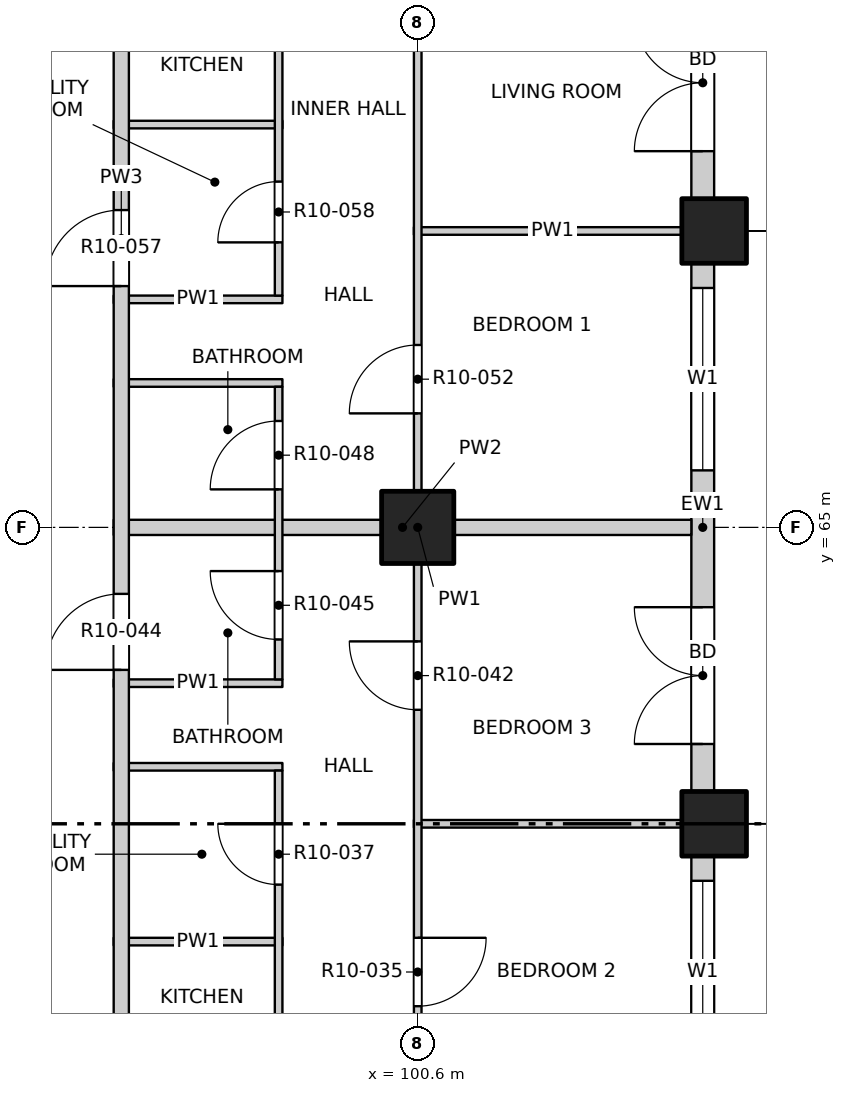
"""IFC4 building model, lengths in metres.
Left out: names, types, materials, properties, quantities, classifications, styles, units other than length and angle.
Written with IfcOpenShell. Run it as: python <this file> out.ifc"""

import sys

from ifc_helpers import new_model, si_unit, direction, frame, frame_2d, origin, origin_2d, place, context, subcontext, project, spatial, rectangle, extrude, element, fill, save


model = new_model("IFC4")
c1 = context("Model", 3, precision=1e-05, world=origin(), true_north=direction((0.0, 1.0)))
c2 = subcontext(c1, "Body", "Model", "MODEL_VIEW")
j1 = project(units=[si_unit("LENGTHUNIT", "METRE"), si_unit("PLANEANGLEUNIT", "RADIAN")], contexts=[c1])
p1 = place(None, origin())
s1 = spatial("IfcSite", under=j1, at=p1, CompositionType="ELEMENT")
p2 = place(p1, origin())
s2 = spatial("IfcBuilding", under=s1, at=p2, CompositionType="ELEMENT")
p3 = place(p2, frame((0.0, 0.0, 123.7)))
s3 = spatial("IfcBuildingStorey", under=s2, at=p3, CompositionType="ELEMENT", Elevation=123.7)
for number, where, z_axis, x_axis in (
    (1, (104.5, 61.1, -0.3), (0.0, 0.0, 1.0), (1.0, 0.0, 0.0)),
    (2, (104.5, 68.9, -0.3), (0.0, 0.0, 1.0), (1.0, 0.0, 0.0)),
):
    element("IfcColumn", number, at=place(p3, frame(where, z_axis=z_axis, x_axis=x_axis)), inside=s3, PredefinedType="COLUMN", context=c2, shape_type="SweptSolid", body=[
        extrude(rectangle(XDim=0.85, YDim=0.85, at=origin_2d()), origin(), (0.0, 0.0, 1.0), 3.45),
    ])
p4 = place(p3, frame((100.6, 65.0, -0.3), z_axis=(0.0, 0.0, 1.0), x_axis=(1.0, 0.0, 0.0)))
e3 = element("IfcColumn", 3, at=p4, inside=s3, PredefinedType="COLUMN", context=c2, shape_type="SweptSolid", body=[
    extrude(rectangle(XDim=0.95, YDim=0.95, at=origin_2d()), origin(), (0.0, 0.0, 1.0), 3.45),
])
p5 = place(p3, frame((104.35, 53.725, 0.0), z_axis=(0.0, 0.0, 1.0), x_axis=(0.0, 1.0, 0.0)))
e4 = element("IfcWall", 4, at=p5, inside=s3, PredefinedType="SOLIDWALL", context=c2, shape_type="SweptSolid", body=[
    extrude(rectangle(XDim=6.95, YDim=0.3, at=frame_2d((3.475, 0.0))), origin(), (0.0, 0.0, 1.0), 2.7),
])
p6 = place(p5, frame((0.625, 0.0, 0.0)))
e5 = element("IfcOpeningElement", 5, at=p6, cuts=e4, PredefinedType="OPENING", context=c2, shape_type="SweptSolid", body=[
    extrude(rectangle(XDim=1.8, YDim=2.4, at=frame_2d((0.9, 1.2))), frame((0.0, 0.16, 0.0), z_axis=(0.0, -1.0, 0.0), x_axis=(1.0, 0.0, 0.0)), (0.0, 0.0, 1.0), 0.32),
])
p7 = place(p5, frame((4.225, 0.0, 0.9)))
e6 = element("IfcOpeningElement", 6, at=p7, cuts=e4, PredefinedType="OPENING", context=c2, shape_type="SweptSolid", body=[
    extrude(rectangle(XDim=2.4, YDim=1.8, at=frame_2d((1.2, 0.9))), frame((0.0, 0.16, 0.0), z_axis=(0.0, -1.0, 0.0), x_axis=(1.0, 0.0, 0.0)), (0.0, 0.0, 1.0), 0.32),
])
p8 = place(p3, frame((104.35, 61.525, 0.0), z_axis=(0.0, 0.0, 1.0), x_axis=(0.0, 1.0, 0.0)))
e7 = element("IfcWall", 7, at=p8, inside=s3, PredefinedType="SOLIDWALL", context=c2, shape_type="SweptSolid", body=[
    extrude(rectangle(XDim=6.95, YDim=0.3, at=frame_2d((3.475, 0.0))), origin(), (0.0, 0.0, 1.0), 2.7),
])
p9 = place(p8, frame((0.625, 0.0, 0.0)))
e8 = element("IfcOpeningElement", 8, at=p9, cuts=e7, PredefinedType="OPENING", context=c2, shape_type="SweptSolid", body=[
    extrude(rectangle(XDim=1.8, YDim=2.4, at=frame_2d((0.9, 1.2))), frame((0.0, 0.16, 0.0), z_axis=(0.0, -1.0, 0.0), x_axis=(1.0, 0.0, 0.0)), (0.0, 0.0, 1.0), 0.32),
])
p10 = place(p8, frame((4.225, 0.0, 0.9)))
e9 = element("IfcOpeningElement", 9, at=p10, cuts=e7, PredefinedType="OPENING", context=c2, shape_type="SweptSolid", body=[
    extrude(rectangle(XDim=2.4, YDim=1.8, at=frame_2d((1.2, 0.9))), frame((0.0, 0.16, 0.0), z_axis=(0.0, -1.0, 0.0), x_axis=(1.0, 0.0, 0.0)), (0.0, 0.0, 1.0), 0.32),
])
p11 = place(p3, frame((104.35, 69.325, 0.0), z_axis=(0.0, 0.0, 1.0), x_axis=(0.0, 1.0, 0.0)))
e10 = element("IfcWall", 10, at=p11, inside=s3, PredefinedType="SOLIDWALL", context=c2, shape_type="SweptSolid", body=[
    extrude(rectangle(XDim=6.95, YDim=0.3, at=frame_2d((3.475, 0.0))), origin(), (0.0, 0.0, 1.0), 2.7),
])
p12 = place(p11, frame((0.625, 0.0, 0.0)))
e11 = element("IfcOpeningElement", 11, at=p12, cuts=e10, PredefinedType="OPENING", context=c2, shape_type="SweptSolid", body=[
    extrude(rectangle(XDim=1.8, YDim=2.4, at=frame_2d((0.9, 1.2))), frame((0.0, 0.16, 0.0), z_axis=(0.0, -1.0, 0.0), x_axis=(1.0, 0.0, 0.0)), (0.0, 0.0, 1.0), 0.32),
])
p13 = place(p11, frame((4.225, 0.0, 0.9)))
e12 = element("IfcOpeningElement", 12, at=p13, cuts=e10, PredefinedType="OPENING", context=c2, shape_type="SweptSolid", body=[
    extrude(rectangle(XDim=2.4, YDim=1.8, at=frame_2d((1.2, 0.9))), frame((0.0, 0.16, 0.0), z_axis=(0.0, -1.0, 0.0), x_axis=(1.0, 0.0, 0.0)), (0.0, 0.0, 1.0), 0.32),
])
p14 = place(p3, frame((96.6, 59.55, 0.0), z_axis=(0.0, 0.0, 1.0), x_axis=(1.0, 0.0, 0.0)))
e13 = element("IfcWall", 13, at=p14, inside=s3, PredefinedType="PARTITIONING", context=c2, shape_type="SweptSolid", body=[
    extrude(rectangle(XDim=2.22, YDim=0.1, at=frame_2d((1.11, 0.0))), origin(), (0.0, 0.0, 1.0), 3.15),
])
p15 = place(p3, frame((100.55, 61.1, 0.0), z_axis=(0.0, 0.0, 1.0), x_axis=(1.0, 0.0, 0.0)))
e14 = element("IfcWall", 14, at=p15, inside=s3, PredefinedType="PARTITIONING", context=c2, shape_type="SweptSolid", body=[
    extrude(rectangle(XDim=3.65, YDim=0.1, at=frame_2d((1.825, 0.0))), origin(), (0.0, 0.0, 1.0), 2.55),
])
for number, where, z_axis, x_axis in (
    (15, (96.6, 61.85, 0.0), (0.0, 0.0, 1.0), (1.0, 0.0, 0.0)),
    (16, (96.6, 62.95, 0.0), (0.0, 0.0, 1.0), (1.0, 0.0, 0.0)),
):
    element("IfcWall", number, at=place(p3, frame(where, z_axis=z_axis, x_axis=x_axis)), inside=s3, PredefinedType="PARTITIONING", context=c2, shape_type="SweptSolid", body=[
        extrude(rectangle(XDim=2.22, YDim=0.1, at=frame_2d((1.11, 0.0))), origin(), (0.0, 0.0, 1.0), 3.15),
    ])
p16 = place(p3, frame((96.6, 65.0, 0.0), z_axis=(0.0, 0.0, 1.0), x_axis=(1.0, 0.0, 0.0)))
e17 = element("IfcWall", 17, at=p16, inside=s3, PredefinedType="PARTITIONING", context=c2, shape_type="SweptSolid", body=[
    extrude(rectangle(XDim=7.6, YDim=0.2, at=frame_2d((3.8, 0.0))), origin(), (0.0, 0.0, 1.0), 3.15),
])
for number, where, z_axis, x_axis in (
    (18, (96.6, 66.9, 0.0), (0.0, 0.0, 1.0), (1.0, 0.0, 0.0)),
    (19, (96.6, 68.0, 0.0), (0.0, 0.0, 1.0), (1.0, 0.0, 0.0)),
):
    element("IfcWall", number, at=place(p3, frame(where, z_axis=z_axis, x_axis=x_axis)), inside=s3, PredefinedType="PARTITIONING", context=c2, shape_type="SweptSolid", body=[
        extrude(rectangle(XDim=2.22, YDim=0.1, at=frame_2d((1.11, 0.0))), origin(), (0.0, 0.0, 1.0), 3.15),
    ])
p17 = place(p3, frame((100.55, 68.9, 0.0), z_axis=(0.0, 0.0, 1.0), x_axis=(1.0, 0.0, 0.0)))
e20 = element("IfcWall", 20, at=p17, inside=s3, PredefinedType="PARTITIONING", context=c2, shape_type="SweptSolid", body=[
    extrude(rectangle(XDim=3.65, YDim=0.1, at=frame_2d((1.825, 0.0))), origin(), (0.0, 0.0, 1.0), 2.55),
])
p18 = place(p3, frame((96.6, 70.3, 0.0), z_axis=(0.0, 0.0, 1.0), x_axis=(1.0, 0.0, 0.0)))
e21 = element("IfcWall", 21, at=p18, inside=s3, PredefinedType="PARTITIONING", context=c2, shape_type="SweptSolid", body=[
    extrude(rectangle(XDim=2.22, YDim=0.1, at=frame_2d((1.11, 0.0))), origin(), (0.0, 0.0, 1.0), 3.15),
])
p19 = place(p3, frame((96.7, 53.4, 0.0), z_axis=(0.0, 0.0, 1.0), x_axis=(0.0, 1.0, 0.0)))
e22 = element("IfcWall", 22, at=p19, inside=s3, PredefinedType="PARTITIONING", context=c2, shape_type="SweptSolid", body=[
    extrude(rectangle(XDim=30.8, YDim=0.2, at=frame_2d((15.4, 0.0))), origin(), (0.0, 0.0, 1.0), 3.15),
])
p20 = place(p19, frame((9.725, 0.0, 0.0)))
e23 = element("IfcOpeningElement", 23, at=p20, cuts=e22, PredefinedType="OPENING", context=c2, shape_type="SweptSolid", body=[
    extrude(rectangle(XDim=1.0, YDim=2.1, at=frame_2d((0.5, 1.05))), frame((0.0, 0.11, 0.0), z_axis=(0.0, -1.0, 0.0), x_axis=(1.0, 0.0, 0.0)), (0.0, 0.0, 1.0), 0.22),
])
p21 = place(p19, frame((14.775, 0.0, 0.0)))
e24 = element("IfcOpeningElement", 24, at=p21, cuts=e22, PredefinedType="OPENING", context=c2, shape_type="SweptSolid", body=[
    extrude(rectangle(XDim=1.0, YDim=2.1, at=frame_2d((0.5, 1.05))), frame((0.0, 0.11, 0.0), z_axis=(0.0, -1.0, 0.0), x_axis=(1.0, 0.0, 0.0)), (0.0, 0.0, 1.0), 0.22),
])
p22 = place(p3, frame((98.77, 49.45, 0.0), z_axis=(0.0, 0.0, 1.0), x_axis=(0.0, 1.0, 0.0)))
e25 = element("IfcWall", 25, at=p22, inside=s3, PredefinedType="PARTITIONING", context=c2, shape_type="SweptSolid", body=[
    extrude(rectangle(XDim=12.35, YDim=0.1, at=frame_2d((6.175, 0.0))), origin(), (0.0, 0.0, 1.0), 3.15),
])
p23 = place(p22, frame((0.4, 0.0, 0.0)))
e26 = element("IfcOpeningElement", 26, at=p23, cuts=e25, PredefinedType="OPENING", context=c2, shape_type="SweptSolid", body=[
    extrude(rectangle(XDim=0.9, YDim=2.1, at=frame_2d((0.45, 1.05))), frame((0.0, 0.06, 0.0), z_axis=(0.0, -1.0, 0.0), x_axis=(1.0, 0.0, 0.0)), (0.0, 0.0, 1.0), 0.12),
])
p24 = place(p22, frame((2.65, 0.0, 0.0)))
e27 = element("IfcOpeningElement", 27, at=p24, cuts=e25, PredefinedType="OPENING", context=c2, shape_type="SweptSolid", body=[
    extrude(rectangle(XDim=0.8, YDim=2.1, at=frame_2d((0.4, 1.05))), frame((0.0, 0.06, 0.0), z_axis=(0.0, -1.0, 0.0), x_axis=(1.0, 0.0, 0.0)), (0.0, 0.0, 1.0), 0.12),
])
p25 = place(p22, frame((5.29, 0.0, 0.0)))
e28 = element("IfcOpeningElement", 28, at=p25, cuts=e25, PredefinedType="OPENING", context=c2, shape_type="SweptSolid", body=[
    extrude(rectangle(XDim=0.8, YDim=2.1, at=frame_2d((0.4, 1.05))), frame((0.0, 0.06, 0.0), z_axis=(0.0, -1.0, 0.0), x_axis=(1.0, 0.0, 0.0)), (0.0, 0.0, 1.0), 0.12),
])
p26 = place(p22, frame((8.115, 0.0, 0.0)))
e29 = element("IfcOpeningElement", 29, at=p26, cuts=e25, PredefinedType="OPENING", context=c2, shape_type="SweptSolid", body=[
    extrude(rectangle(XDim=0.9, YDim=2.1, at=frame_2d((0.45, 1.05))), frame((0.0, 0.06, 0.0), z_axis=(0.0, -1.0, 0.0), x_axis=(1.0, 0.0, 0.0)), (0.0, 0.0, 1.0), 0.12),
])
p27 = place(p22, frame((10.85, 0.0, 0.0)))
e30 = element("IfcOpeningElement", 30, at=p27, cuts=e25, PredefinedType="OPENING", context=c2, shape_type="SweptSolid", body=[
    extrude(rectangle(XDim=0.8, YDim=2.1, at=frame_2d((0.4, 1.05))), frame((0.0, 0.06, 0.0), z_axis=(0.0, -1.0, 0.0), x_axis=(1.0, 0.0, 0.0)), (0.0, 0.0, 1.0), 0.12),
])
p28 = place(p3, frame((98.77, 63.0, 0.0), z_axis=(0.0, 0.0, 1.0), x_axis=(0.0, 1.0, 0.0)))
e31 = element("IfcWall", 31, at=p28, inside=s3, PredefinedType="PARTITIONING", context=c2, shape_type="SweptSolid", body=[
    extrude(rectangle(XDim=3.85, YDim=0.1, at=frame_2d((1.925, 0.0))), origin(), (0.0, 0.0, 1.0), 3.15),
])
p29 = place(p28, frame((0.525, 0.0, 0.0)))
e32 = element("IfcOpeningElement", 32, at=p29, cuts=e31, PredefinedType="OPENING", context=c2, shape_type="SweptSolid", body=[
    extrude(rectangle(XDim=0.9, YDim=2.1, at=frame_2d((0.45, 1.05))), frame((0.0, 0.06, 0.0), z_axis=(0.0, -1.0, 0.0), x_axis=(1.0, 0.0, 0.0)), (0.0, 0.0, 1.0), 0.12),
])
p30 = place(p28, frame((2.5, 0.0, 0.0)))
e33 = element("IfcOpeningElement", 33, at=p30, cuts=e31, PredefinedType="OPENING", context=c2, shape_type="SweptSolid", body=[
    extrude(rectangle(XDim=0.9, YDim=2.1, at=frame_2d((0.45, 1.05))), frame((0.0, 0.06, 0.0), z_axis=(0.0, -1.0, 0.0), x_axis=(1.0, 0.0, 0.0)), (0.0, 0.0, 1.0), 0.12),
])
p31 = place(p3, frame((98.77, 68.05, 0.0), z_axis=(0.0, 0.0, 1.0), x_axis=(0.0, 1.0, 0.0)))
e34 = element("IfcWall", 34, at=p31, inside=s3, PredefinedType="PARTITIONING", context=c2, shape_type="SweptSolid", body=[
    extrude(rectangle(XDim=12.5, YDim=0.1, at=frame_2d((6.25, 0.0))), origin(), (0.0, 0.0, 1.0), 3.15),
])
p32 = place(p31, frame((0.7, 0.0, 0.0)))
e35 = element("IfcOpeningElement", 35, at=p32, cuts=e34, PredefinedType="OPENING", context=c2, shape_type="SweptSolid", body=[
    extrude(rectangle(XDim=0.8, YDim=2.1, at=frame_2d((0.4, 1.05))), frame((0.0, 0.06, 0.0), z_axis=(0.0, -1.0, 0.0), x_axis=(1.0, 0.0, 0.0)), (0.0, 0.0, 1.0), 0.12),
])
p33 = place(p31, frame((3.41, 0.0, 0.0)))
e36 = element("IfcOpeningElement", 36, at=p33, cuts=e34, PredefinedType="OPENING", context=c2, shape_type="SweptSolid", body=[
    extrude(rectangle(XDim=0.9, YDim=2.1, at=frame_2d((0.45, 1.05))), frame((0.0, 0.06, 0.0), z_axis=(0.0, -1.0, 0.0), x_axis=(1.0, 0.0, 0.0)), (0.0, 0.0, 1.0), 0.12),
])
p34 = place(p31, frame((5.92, 0.0, 0.0)))
e37 = element("IfcOpeningElement", 37, at=p34, cuts=e34, PredefinedType="OPENING", context=c2, shape_type="SweptSolid", body=[
    extrude(rectangle(XDim=0.9, YDim=2.1, at=frame_2d((0.45, 1.05))), frame((0.0, 0.06, 0.0), z_axis=(0.0, -1.0, 0.0), x_axis=(1.0, 0.0, 0.0)), (0.0, 0.0, 1.0), 0.12),
])
p35 = place(p31, frame((8.21, 0.0, 0.0)))
e38 = element("IfcOpeningElement", 38, at=p35, cuts=e34, PredefinedType="OPENING", context=c2, shape_type="SweptSolid", body=[
    extrude(rectangle(XDim=0.8, YDim=2.1, at=frame_2d((0.4, 1.05))), frame((0.0, 0.06, 0.0), z_axis=(0.0, -1.0, 0.0), x_axis=(1.0, 0.0, 0.0)), (0.0, 0.0, 1.0), 0.12),
])
p36 = place(p31, frame((10.85, 0.0, 0.0)))
e39 = element("IfcOpeningElement", 39, at=p36, cuts=e34, PredefinedType="OPENING", context=c2, shape_type="SweptSolid", body=[
    extrude(rectangle(XDim=0.8, YDim=2.1, at=frame_2d((0.4, 1.05))), frame((0.0, 0.06, 0.0), z_axis=(0.0, -1.0, 0.0), x_axis=(1.0, 0.0, 0.0)), (0.0, 0.0, 1.0), 0.12),
])
p37 = place(p3, frame((100.6, 45.8, 0.0), z_axis=(0.0, 0.0, 1.0), x_axis=(0.0, 1.0, 0.0)))
e40 = element("IfcWall", 40, at=p37, inside=s3, PredefinedType="PARTITIONING", context=c2, shape_type="SweptSolid", body=[
    extrude(rectangle(XDim=38.4, YDim=0.1, at=frame_2d((19.2, 0.0))), origin(), (0.0, 0.0, 1.0), 3.15),
])
p38 = place(p37, frame((1.05, 0.0, 0.0)))
e41 = element("IfcOpeningElement", 41, at=p38, cuts=e40, PredefinedType="OPENING", context=c2, shape_type="SweptSolid", body=[
    extrude(rectangle(XDim=1.2, YDim=2.1, at=frame_2d((0.6, 1.05))), frame((0.0, 0.06, 0.0), z_axis=(0.0, -1.0, 0.0), x_axis=(1.0, 0.0, 0.0)), (0.0, 0.0, 1.0), 0.12),
])
p39 = place(p37, frame((6.9, 0.0, 0.0)))
e42 = element("IfcOpeningElement", 42, at=p39, cuts=e40, PredefinedType="OPENING", context=c2, shape_type="SweptSolid", body=[
    extrude(rectangle(XDim=1.2, YDim=2.1, at=frame_2d((0.6, 1.05))), frame((0.0, 0.06, 0.0), z_axis=(0.0, -1.0, 0.0), x_axis=(1.0, 0.0, 0.0)), (0.0, 0.0, 1.0), 0.12),
])
p40 = place(p37, frame((12.9, 0.0, 0.0)))
e43 = element("IfcOpeningElement", 43, at=p40, cuts=e40, PredefinedType="OPENING", context=c2, shape_type="SweptSolid", body=[
    extrude(rectangle(XDim=0.9, YDim=2.1, at=frame_2d((0.45, 1.05))), frame((0.0, 0.06, 0.0), z_axis=(0.0, -1.0, 0.0), x_axis=(1.0, 0.0, 0.0)), (0.0, 0.0, 1.0), 0.12),
])
p41 = place(p37, frame((16.8, 0.0, 0.0)))
e44 = element("IfcOpeningElement", 44, at=p41, cuts=e40, PredefinedType="OPENING", context=c2, shape_type="SweptSolid", body=[
    extrude(rectangle(XDim=0.9, YDim=2.1, at=frame_2d((0.45, 1.05))), frame((0.0, 0.06, 0.0), z_axis=(0.0, -1.0, 0.0), x_axis=(1.0, 0.0, 0.0)), (0.0, 0.0, 1.0), 0.12),
])
p42 = place(p37, frame((20.7, 0.0, 0.0)))
e45 = element("IfcOpeningElement", 45, at=p42, cuts=e40, PredefinedType="OPENING", context=c2, shape_type="SweptSolid", body=[
    extrude(rectangle(XDim=0.9, YDim=2.1, at=frame_2d((0.45, 1.05))), frame((0.0, 0.06, 0.0), z_axis=(0.0, -1.0, 0.0), x_axis=(1.0, 0.0, 0.0)), (0.0, 0.0, 1.0), 0.12),
])
p43 = place(p37, frame((27.575, 0.0, 0.0)))
e46 = element("IfcOpeningElement", 46, at=p43, cuts=e40, PredefinedType="OPENING", context=c2, shape_type="SweptSolid", body=[
    extrude(rectangle(XDim=1.2, YDim=2.1, at=frame_2d((0.6, 1.05))), frame((0.0, 0.06, 0.0), z_axis=(0.0, -1.0, 0.0), x_axis=(1.0, 0.0, 0.0)), (0.0, 0.0, 1.0), 0.12),
])
p44 = place(p37, frame((32.4, 0.0, 0.0)))
e47 = element("IfcOpeningElement", 47, at=p44, cuts=e40, PredefinedType="OPENING", context=c2, shape_type="SweptSolid", body=[
    extrude(rectangle(XDim=0.9, YDim=2.1, at=frame_2d((0.45, 1.05))), frame((0.0, 0.06, 0.0), z_axis=(0.0, -1.0, 0.0), x_axis=(1.0, 0.0, 0.0)), (0.0, 0.0, 1.0), 0.12),
])
p45 = place(p37, frame((36.15, 0.0, 0.0)))
e48 = element("IfcOpeningElement", 48, at=p45, cuts=e40, PredefinedType="OPENING", context=c2, shape_type="SweptSolid", body=[
    extrude(rectangle(XDim=1.2, YDim=2.1, at=frame_2d((0.6, 1.05))), frame((0.0, 0.06, 0.0), z_axis=(0.0, -1.0, 0.0), x_axis=(1.0, 0.0, 0.0)), (0.0, 0.0, 1.0), 0.12),
])
p46 = place(p7, origin())
e49 = element("IfcWindow", 49, at=p46, inside=s3, PartitioningType="DOUBLE_PANEL_VERTICAL", PredefinedType="WINDOW", context=c2, shape_type="SweptSolid", body=[
    extrude(rectangle(XDim=2.4, YDim=1.8, at=frame_2d((1.2, 0.9))), frame((0.0, 0.03, 0.0), z_axis=(0.0, -1.0, 0.0), x_axis=(1.0, 0.0, 0.0)), (0.0, 0.0, 1.0), 0.06),
])
fill(e6, e49)
p47 = place(p9, origin())
e50 = element("IfcDoor", 50, at=p47, inside=s3, OperationType="DOUBLE_DOOR_SINGLE_SWING", PredefinedType="DOOR", context=c2, shape_type="SweptSolid", body=[
    extrude(rectangle(XDim=1.8, YDim=2.4, at=frame_2d((0.9, 1.2))), frame((0.0, 0.025, 0.0), z_axis=(0.0, -1.0, 0.0), x_axis=(1.0, 0.0, 0.0)), (0.0, 0.0, 1.0), 0.05),
])
fill(e8, e50)
p48 = place(p10, origin())
e51 = element("IfcWindow", 51, at=p48, inside=s3, PartitioningType="DOUBLE_PANEL_VERTICAL", PredefinedType="WINDOW", context=c2, shape_type="SweptSolid", body=[
    extrude(rectangle(XDim=2.4, YDim=1.8, at=frame_2d((1.2, 0.9))), frame((0.0, 0.03, 0.0), z_axis=(0.0, -1.0, 0.0), x_axis=(1.0, 0.0, 0.0)), (0.0, 0.0, 1.0), 0.06),
])
fill(e9, e51)
p49 = place(p12, origin())
e52 = element("IfcDoor", 52, at=p49, inside=s3, OperationType="DOUBLE_DOOR_SINGLE_SWING", PredefinedType="DOOR", context=c2, shape_type="SweptSolid", body=[
    extrude(rectangle(XDim=1.8, YDim=2.4, at=frame_2d((0.9, 1.2))), frame((0.0, 0.025, 0.0), z_axis=(0.0, -1.0, 0.0), x_axis=(1.0, 0.0, 0.0)), (0.0, 0.0, 1.0), 0.05),
])
fill(e11, e52)
p50 = place(p40, origin())
e53 = element("IfcDoor", 53, at=p50, inside=s3, OperationType="SINGLE_SWING_LEFT", PredefinedType="DOOR", context=c2, shape_type="SweptSolid", body=[
    extrude(rectangle(XDim=0.9, YDim=2.1, at=frame_2d((0.45, 1.05))), frame((0.0, 0.025, 0.0), z_axis=(0.0, -1.0, 0.0), x_axis=(1.0, 0.0, 0.0)), (0.0, 0.0, 1.0), 0.05),
])
fill(e43, e53)
p51 = place(p27, origin())
e54 = element("IfcDoor", 54, at=p51, inside=s3, OperationType="SINGLE_SWING_RIGHT", PredefinedType="DOOR", context=c2, shape_type="SweptSolid", body=[
    extrude(rectangle(XDim=0.8, YDim=2.1, at=frame_2d((0.4, 1.05))), frame((0.0, 0.025, 0.0), z_axis=(0.0, -1.0, 0.0), x_axis=(1.0, 0.0, 0.0)), (0.0, 0.0, 1.0), 0.05),
])
fill(e30, e54)
p52 = place(p41, origin())
e55 = element("IfcDoor", 55, at=p52, inside=s3, OperationType="SINGLE_SWING_RIGHT", PredefinedType="DOOR", context=c2, shape_type="SweptSolid", body=[
    extrude(rectangle(XDim=0.9, YDim=2.1, at=frame_2d((0.45, 1.05))), frame((0.0, 0.025, 0.0), z_axis=(0.0, -1.0, 0.0), x_axis=(1.0, 0.0, 0.0)), (0.0, 0.0, 1.0), 0.05),
])
fill(e44, e55)
p53 = place(p20, origin())
e56 = element("IfcDoor", 56, at=p53, inside=s3, OperationType="SINGLE_SWING_LEFT", PredefinedType="DOOR", context=c2, shape_type="SweptSolid", body=[
    extrude(rectangle(XDim=1.0, YDim=2.1, at=frame_2d((0.5, 1.05))), frame((0.0, 0.025, 0.0), z_axis=(0.0, -1.0, 0.0), x_axis=(1.0, 0.0, 0.0)), (0.0, 0.0, 1.0), 0.05),
])
fill(e23, e56)
p54 = place(p29, origin())
e57 = element("IfcDoor", 57, at=p54, inside=s3, OperationType="SINGLE_SWING_RIGHT", PredefinedType="DOOR", context=c2, shape_type="SweptSolid", body=[
    extrude(rectangle(XDim=0.9, YDim=2.1, at=frame_2d((0.45, 1.05))), frame((0.0, 0.025, 0.0), z_axis=(0.0, -1.0, 0.0), x_axis=(1.0, 0.0, 0.0)), (0.0, 0.0, 1.0), 0.05),
])
fill(e32, e57)
p55 = place(p30, origin())
e58 = element("IfcDoor", 58, at=p55, inside=s3, OperationType="SINGLE_SWING_LEFT", PredefinedType="DOOR", context=c2, shape_type="SweptSolid", body=[
    extrude(rectangle(XDim=0.9, YDim=2.1, at=frame_2d((0.45, 1.05))), frame((0.0, 0.025, 0.0), z_axis=(0.0, -1.0, 0.0), x_axis=(1.0, 0.0, 0.0)), (0.0, 0.0, 1.0), 0.05),
])
fill(e33, e58)
p56 = place(p42, origin())
e59 = element("IfcDoor", 59, at=p56, inside=s3, OperationType="SINGLE_SWING_LEFT", PredefinedType="DOOR", context=c2, shape_type="SweptSolid", body=[
    extrude(rectangle(XDim=0.9, YDim=2.1, at=frame_2d((0.45, 1.05))), frame((0.0, 0.025, 0.0), z_axis=(0.0, -1.0, 0.0), x_axis=(1.0, 0.0, 0.0)), (0.0, 0.0, 1.0), 0.05),
])
fill(e45, e59)
p57 = place(p21, origin())
e60 = element("IfcDoor", 60, at=p57, inside=s3, OperationType="SINGLE_SWING_LEFT", PredefinedType="DOOR", context=c2, shape_type="SweptSolid", body=[
    extrude(rectangle(XDim=1.0, YDim=2.1, at=frame_2d((0.5, 1.05))), frame((0.0, 0.025, 0.0), z_axis=(0.0, -1.0, 0.0), x_axis=(1.0, 0.0, 0.0)), (0.0, 0.0, 1.0), 0.05),
])
fill(e24, e60)
p58 = place(p32, origin())
e61 = element("IfcDoor", 61, at=p58, inside=s3, OperationType="SINGLE_SWING_LEFT", PredefinedType="DOOR", context=c2, shape_type="SweptSolid", body=[
    extrude(rectangle(XDim=0.8, YDim=2.1, at=frame_2d((0.4, 1.05))), frame((0.0, 0.025, 0.0), z_axis=(0.0, -1.0, 0.0), x_axis=(1.0, 0.0, 0.0)), (0.0, 0.0, 1.0), 0.05),
])
fill(e35, e61)
save(model, sys.argv[1])
